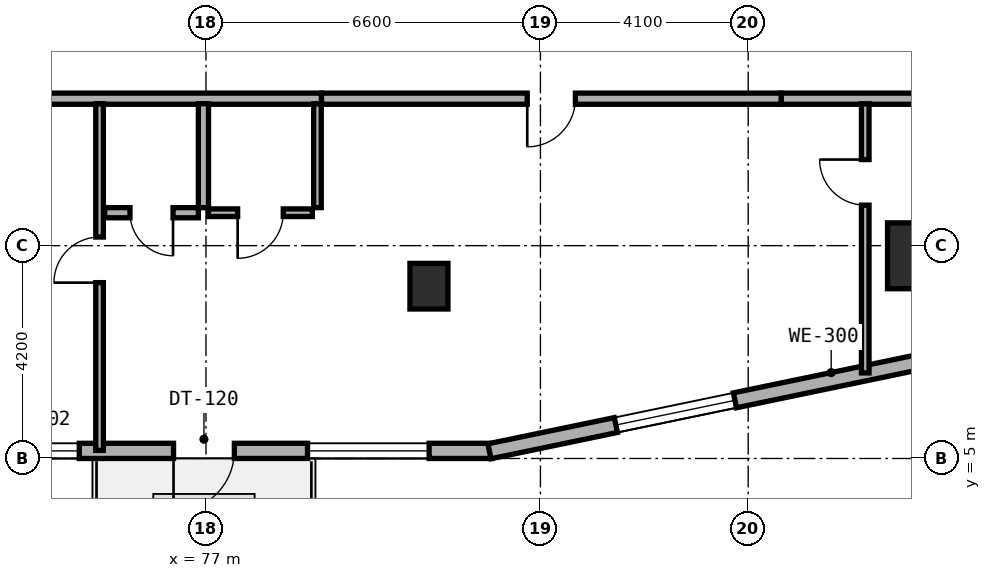
"""IFC4 building model, lengths in metres.
Left out: names, types, materials, properties, quantities, classifications, styles, units other than length and angle.
Written with IfcOpenShell. Run it as: python <this file> out.ifc"""

import sys

from ifc_helpers import new_model, si_unit, direction, frame, frame_2d, origin, origin_2d, place, context, subcontext, project, spatial, rectangle, extrude, element, fill, save


model = new_model("IFC4")
c1 = context("Model", 3, precision=1e-05, world=origin(), true_north=direction((0.0, 1.0)))
c2 = subcontext(c1, "Body", "Model", "MODEL_VIEW")
j1 = project(units=[si_unit("LENGTHUNIT", "METRE"), si_unit("PLANEANGLEUNIT", "RADIAN")], contexts=[c1])
p1 = place(None, origin())
s1 = spatial("IfcSite", under=j1, at=p1, CompositionType="ELEMENT")
p2 = place(p1, origin())
s2 = spatial("IfcBuilding", under=s1, at=p2, CompositionType="ELEMENT")
p3 = place(p2, frame((0.0, 0.0, 27.5)))
s3 = spatial("IfcBuildingStorey", under=s2, at=p3, CompositionType="ELEMENT", Elevation=27.5)
p4 = place(p3, frame((81.4, 8.4, 0.0), z_axis=(0.0, 0.0, 1.0), x_axis=(1.0, 0.0, 0.0)))
e1 = element("IfcColumn", 1, at=p4, inside=s3, PredefinedType="COLUMN", context=c2, shape_type="SweptSolid", body=[
    extrude(rectangle(XDim=0.75, YDim=0.9, at=origin_2d()), origin(), (0.0, 0.0, 1.0), 3.5),
])
p5 = place(p3, frame((91.0, 9.0, 0.0), z_axis=(0.0, 0.0, 1.0), x_axis=(1.0, 0.0, 0.0)))
e2 = element("IfcColumn", 2, at=p5, inside=s3, PredefinedType="COLUMN", context=c2, shape_type="SweptSolid", body=[
    extrude(rectangle(XDim=1.1, YDim=1.3, at=origin_2d()), origin(), (0.0, 0.0, 1.0), 3.5),
])
p6 = place(p3, frame((71.247, 5.15, 0.0), z_axis=(0.0, 0.0, 1.0), x_axis=(1.0, 0.0, 0.0)))
e3 = element("IfcWall", 3, at=p6, inside=s3, PredefinedType="STANDARD", context=c2, shape_type="SweptSolid", body=[
    extrude(rectangle(XDim=11.391, YDim=0.3, at=frame_2d((5.695, 0.0))), origin(), (0.0, 0.0, 1.0), 3.25),
])
p7 = place(p6, frame((5.113, 0.0, 0.0)))
e4 = element("IfcOpeningElement", 4, at=p7, cuts=e3, PredefinedType="OPENING", context=c2, shape_type="SweptSolid", body=[
    extrude(rectangle(XDim=1.2, YDim=2.15, at=frame_2d((0.6, 1.075))), frame((0.0, 0.16, 0.0), z_axis=(0.0, -1.0, 0.0), x_axis=(1.0, 0.0, 0.0)), (0.0, 0.0, 1.0), 0.32),
])
p8 = place(p6, frame((1.753, 0.0, 0.85)))
e5 = element("IfcOpeningElement", 5, at=p8, cuts=e3, PredefinedType="OPENING", context=c2, shape_type="SweptSolid", body=[
    extrude(rectangle(XDim=1.5, YDim=1.5, at=frame_2d((0.75, 0.75))), frame((0.0, 0.16, 0.0), z_axis=(0.0, -1.0, 0.0), x_axis=(1.0, 0.0, 0.0)), (0.0, 0.0, 1.0), 0.32),
])
p9 = place(p6, frame((7.757, 0.0, 0.8)))
e6 = element("IfcOpeningElement", 6, at=p9, cuts=e3, PredefinedType="OPENING", context=c2, shape_type="SweptSolid", body=[
    extrude(rectangle(XDim=2.4, YDim=1.6, at=frame_2d((1.2, 0.8))), frame((0.0, 0.16, 0.0), z_axis=(0.0, -1.0, 0.0), x_axis=(1.0, 0.0, 0.0)), (0.0, 0.0, 1.0), 0.32),
])
p10 = place(p3, frame((82.594, 5.142, 0.0), z_axis=(0.0, 0.0, 1.0), x_axis=(0.979125485139, 0.203256695712, 0.0)))
e7 = element("IfcWall", 7, at=p10, inside=s3, PredefinedType="STANDARD", context=c2, shape_type="SweptSolid", body=[
    extrude(rectangle(XDim=8.89, YDim=0.3, at=frame_2d((4.445, 0.0))), origin(), (0.0, 0.0, 1.0), 3.25),
])
p11 = place(p10, frame((2.548, 0.0, 0.8)))
e8 = element("IfcOpeningElement", 8, at=p11, cuts=e7, PredefinedType="OPENING", context=c2, shape_type="SweptSolid", body=[
    extrude(rectangle(XDim=2.4, YDim=1.6, at=frame_2d((1.2, 0.8))), frame((0.0, 0.16, 0.0), z_axis=(0.0, -1.0, 0.0), x_axis=(1.0, 0.0, 0.0)), (0.0, 0.0, 1.0), 0.32),
])
p12 = place(p3, frame((72.6, 12.1, 0.0), z_axis=(0.0, 0.0, 1.0), x_axis=(1.0, 0.0, 0.0)))
e9 = element("IfcWall", 9, at=p12, inside=s3, PredefinedType="SOLIDWALL", context=c2, shape_type="SweptSolid", body=[
    extrude(rectangle(XDim=6.68, YDim=0.22, at=frame_2d((3.34, 0.0))), origin(), (0.0, 0.0, 1.0), 2.725),
])
p13 = place(p3, frame((88.35, 12.1, 0.0), z_axis=(0.0, 0.0, 1.0), x_axis=(1.0, 0.0, 0.0)))
e10 = element("IfcWall", 10, at=p13, inside=s3, PredefinedType="SOLIDWALL", context=c2, shape_type="SweptSolid", body=[
    extrude(rectangle(XDim=7.41, YDim=0.22, at=frame_2d((3.705, 0.0))), origin(), (0.0, 0.0, 1.0), 2.865),
])
p14 = place(p3, frame((79.28, 12.1, 0.0), z_axis=(0.0, 0.0, 1.0), x_axis=(1.0, 0.0, 0.0)))
e11 = element("IfcWall", 11, at=p14, inside=s3, PredefinedType="SOLIDWALL", context=c2, shape_type="SweptSolid", body=[
    extrude(rectangle(XDim=9.07, YDim=0.22, at=frame_2d((4.535, 0.0))), origin(), (0.0, 0.0, 1.0), 2.725),
])
p15 = place(p14, frame((4.06, 0.0, 0.0)))
e12 = element("IfcOpeningElement", 12, at=p15, cuts=e11, PredefinedType="OPENING", context=c2, shape_type="SweptSolid", body=[
    extrude(rectangle(XDim=0.95, YDim=2.1, at=frame_2d((0.475, 1.05))), frame((0.0, 0.12, 0.0), z_axis=(0.0, -1.0, 0.0), x_axis=(1.0, 0.0, 0.0)), (0.0, 0.0, 1.0), 0.24),
])
p16 = place(p3, frame((74.9, 5.16, 0.0), z_axis=(0.0, 0.0, 1.0), x_axis=(0.0, 1.0, 0.0)))
e13 = element("IfcWall", 13, at=p16, inside=s3, PredefinedType="PARTITIONING", context=c2, shape_type="SweptSolid", body=[
    extrude(rectangle(XDim=6.84, YDim=0.15, at=frame_2d((3.42, 0.0))), origin(), (0.0, 0.0, 1.0), 2.775),
])
p17 = place(p16, frame((3.31, 0.0, 0.0)))
e14 = element("IfcOpeningElement", 14, at=p17, cuts=e13, PredefinedType="OPENING", context=c2, shape_type="SweptSolid", body=[
    extrude(rectangle(XDim=0.9, YDim=2.1, at=frame_2d((0.45, 1.05))), frame((0.0, 0.085, 0.0), z_axis=(0.0, -1.0, 0.0), x_axis=(1.0, 0.0, 0.0)), (0.0, 0.0, 1.0), 0.17),
])
p18 = place(p3, frame((90.01, 6.689, 0.0), z_axis=(0.0, 0.0, 1.0), x_axis=(0.0, 1.0, 0.0)))
e15 = element("IfcWall", 15, at=p18, inside=s3, PredefinedType="PARTITIONING", context=c2, shape_type="SweptSolid", body=[
    extrude(rectangle(XDim=5.311, YDim=0.15, at=frame_2d((2.656, 0.0))), origin(), (0.0, 0.0, 1.0), 2.865),
])
p19 = place(p18, frame((3.31, 0.0, 0.0)))
e16 = element("IfcOpeningElement", 16, at=p19, cuts=e15, PredefinedType="OPENING", context=c2, shape_type="SweptSolid", body=[
    extrude(rectangle(XDim=0.9, YDim=2.1, at=frame_2d((0.45, 1.05))), frame((0.0, 0.085, 0.0), z_axis=(0.0, -1.0, 0.0), x_axis=(1.0, 0.0, 0.0)), (0.0, 0.0, 1.0), 0.17),
])
p20 = place(p3, frame((76.95, 9.95, 0.0), z_axis=(0.0, 0.0, 1.0), x_axis=(0.0, 1.0, 0.0)))
e17 = element("IfcWall", 17, at=p20, inside=s3, PredefinedType="PLUMBINGWALL", context=c2, shape_type="SweptSolid", body=[
    extrude(rectangle(XDim=2.05, YDim=0.2, at=frame_2d((1.025, 0.0))), origin(), (0.0, 0.0, 1.0), 2.775),
])
p21 = place(p3, frame((79.2, 9.95, 0.0), z_axis=(0.0, 0.0, 1.0), x_axis=(0.0, 1.0, 0.0)))
e18 = element("IfcWall", 18, at=p21, inside=s3, PredefinedType="PARTITIONING", context=c2, shape_type="SweptSolid", body=[
    extrude(rectangle(XDim=2.05, YDim=0.15, at=frame_2d((1.025, 0.0))), origin(), (0.0, 0.0, 1.0), 2.775),
])
p22 = place(p3, frame((75.0, 9.85, 0.0), z_axis=(0.0, 0.0, 1.0), x_axis=(1.0, 0.0, 0.0)))
e19 = element("IfcWall", 19, at=p22, inside=s3, PredefinedType="PLUMBINGWALL", context=c2, shape_type="SweptSolid", body=[
    extrude(rectangle(XDim=1.85, YDim=0.2, at=frame_2d((0.925, 0.0))), origin(), (0.0, 0.0, 1.0), 3.22),
])
p23 = place(p22, frame((0.5, 0.0, 0.0)))
e20 = element("IfcOpeningElement", 20, at=p23, cuts=e19, PredefinedType="OPENING", context=c2, shape_type="SweptSolid", body=[
    extrude(rectangle(XDim=0.85, YDim=2.1, at=frame_2d((0.425, 1.05))), frame((0.0, 0.11, 0.0), z_axis=(0.0, -1.0, 0.0), x_axis=(1.0, 0.0, 0.0)), (0.0, 0.0, 1.0), 0.22),
])
p24 = place(p3, frame((77.05, 9.85, 0.0), z_axis=(0.0, 0.0, 1.0), x_axis=(1.0, 0.0, 0.0)))
e21 = element("IfcWall", 21, at=p24, inside=s3, PredefinedType="PARTITIONING", context=c2, shape_type="SweptSolid", body=[
    extrude(rectangle(XDim=2.05, YDim=0.15, at=frame_2d((1.025, 0.0))), origin(), (0.0, 0.0, 1.0), 3.22),
])
p25 = place(p24, frame((0.575, 0.0, 0.0)))
e22 = element("IfcOpeningElement", 22, at=p25, cuts=e21, PredefinedType="OPENING", context=c2, shape_type="SweptSolid", body=[
    extrude(rectangle(XDim=0.9, YDim=2.1, at=frame_2d((0.45, 1.05))), frame((0.0, 0.085, 0.0), z_axis=(0.0, -1.0, 0.0), x_axis=(1.0, 0.0, 0.0)), (0.0, 0.0, 1.0), 0.17),
])
p26 = place(p7, frame((1.2, 0.0, 0.0), z_axis=(0.0, 0.0, 1.0), x_axis=(-1.0, 0.0, 0.0)))
e23 = element("IfcDoor", 23, at=p26, inside=s3, OperationType="SINGLE_SWING_RIGHT", PredefinedType="DOOR", context=c2, shape_type="SweptSolid", body=[
    extrude(rectangle(XDim=1.2, YDim=2.15, at=frame_2d((0.6, 1.075))), frame((0.0, 0.025, 0.0), z_axis=(0.0, -1.0, 0.0), x_axis=(1.0, 0.0, 0.0)), (0.0, 0.0, 1.0), 0.05),
])
fill(e4, e23)
p27 = place(p8, origin())
e24 = element("IfcWindow", 24, at=p27, inside=s3, PartitioningType="SINGLE_PANEL", PredefinedType="WINDOW", context=c2, shape_type="SweptSolid", body=[
    extrude(rectangle(XDim=1.5, YDim=1.5, at=frame_2d((0.75, 0.75))), frame((0.0, 0.03, 0.0), z_axis=(0.0, -1.0, 0.0), x_axis=(1.0, 0.0, 0.0)), (0.0, 0.0, 1.0), 0.06),
])
fill(e5, e24)
p28 = place(p9, origin())
e25 = element("IfcWindow", 25, at=p28, inside=s3, PartitioningType="SINGLE_PANEL", PredefinedType="WINDOW", context=c2, shape_type="SweptSolid", body=[
    extrude(rectangle(XDim=2.4, YDim=1.6, at=frame_2d((1.2, 0.8))), frame((0.0, 0.03, 0.0), z_axis=(0.0, -1.0, 0.0), x_axis=(1.0, 0.0, 0.0)), (0.0, 0.0, 1.0), 0.06),
])
fill(e6, e25)
p29 = place(p11, origin())
e26 = element("IfcWindow", 26, at=p29, inside=s3, PartitioningType="SINGLE_PANEL", PredefinedType="WINDOW", context=c2, shape_type="SweptSolid", body=[
    extrude(rectangle(XDim=2.4, YDim=1.6, at=frame_2d((1.2, 0.8))), frame((0.0, 0.03, 0.0), z_axis=(0.0, -1.0, 0.0), x_axis=(1.0, 0.0, 0.0)), (0.0, 0.0, 1.0), 0.06),
])
fill(e8, e26)
p30 = place(p15, frame((0.95, 0.0, 0.0), z_axis=(0.0, 0.0, 1.0), x_axis=(-1.0, 0.0, 0.0)))
e27 = element("IfcDoor", 27, at=p30, inside=s3, OperationType="SINGLE_SWING_RIGHT", PredefinedType="DOOR", context=c2, shape_type="SweptSolid", body=[
    extrude(rectangle(XDim=0.95, YDim=2.1, at=frame_2d((0.475, 1.05))), frame((0.0, 0.025, 0.0), z_axis=(0.0, -1.0, 0.0), x_axis=(1.0, 0.0, 0.0)), (0.0, 0.0, 1.0), 0.05),
])
fill(e12, e27)
p31 = place(p17, origin())
e28 = element("IfcDoor", 28, at=p31, inside=s3, OperationType="SINGLE_SWING_LEFT", PredefinedType="DOOR", context=c2, shape_type="SweptSolid", body=[
    extrude(rectangle(XDim=0.9, YDim=2.1, at=frame_2d((0.45, 1.05))), frame((0.0, 0.025, 0.0), z_axis=(0.0, -1.0, 0.0), x_axis=(1.0, 0.0, 0.0)), (0.0, 0.0, 1.0), 0.05),
])
fill(e14, e28)
p32 = place(p19, origin())
e29 = element("IfcDoor", 29, at=p32, inside=s3, OperationType="SINGLE_SWING_RIGHT", PredefinedType="DOOR", context=c2, shape_type="SweptSolid", body=[
    extrude(rectangle(XDim=0.9, YDim=2.1, at=frame_2d((0.45, 1.05))), frame((0.0, 0.025, 0.0), z_axis=(0.0, -1.0, 0.0), x_axis=(1.0, 0.0, 0.0)), (0.0, 0.0, 1.0), 0.05),
])
fill(e16, e29)
p33 = place(p23, frame((0.85, 0.0, 0.0), z_axis=(0.0, 0.0, 1.0), x_axis=(-1.0, 0.0, 0.0)))
e30 = element("IfcDoor", 30, at=p33, inside=s3, OperationType="SINGLE_SWING_LEFT", PredefinedType="DOOR", context=c2, shape_type="SweptSolid", body=[
    extrude(rectangle(XDim=0.85, YDim=2.1, at=frame_2d((0.425, 1.05))), frame((0.0, 0.025, 0.0), z_axis=(0.0, -1.0, 0.0), x_axis=(1.0, 0.0, 0.0)), (0.0, 0.0, 1.0), 0.05),
])
fill(e20, e30)
p34 = place(p25, frame((0.9, 0.0, 0.0), z_axis=(0.0, 0.0, 1.0), x_axis=(-1.0, 0.0, 0.0)))
e31 = element("IfcDoor", 31, at=p34, inside=s3, OperationType="SINGLE_SWING_RIGHT", PredefinedType="DOOR", context=c2, shape_type="SweptSolid", body=[
    extrude(rectangle(XDim=0.9, YDim=2.1, at=frame_2d((0.45, 1.05))), frame((0.0, 0.025, 0.0), z_axis=(0.0, -1.0, 0.0), x_axis=(1.0, 0.0, 0.0)), (0.0, 0.0, 1.0), 0.05),
])
fill(e22, e31)
save(model, sys.argv[1])
